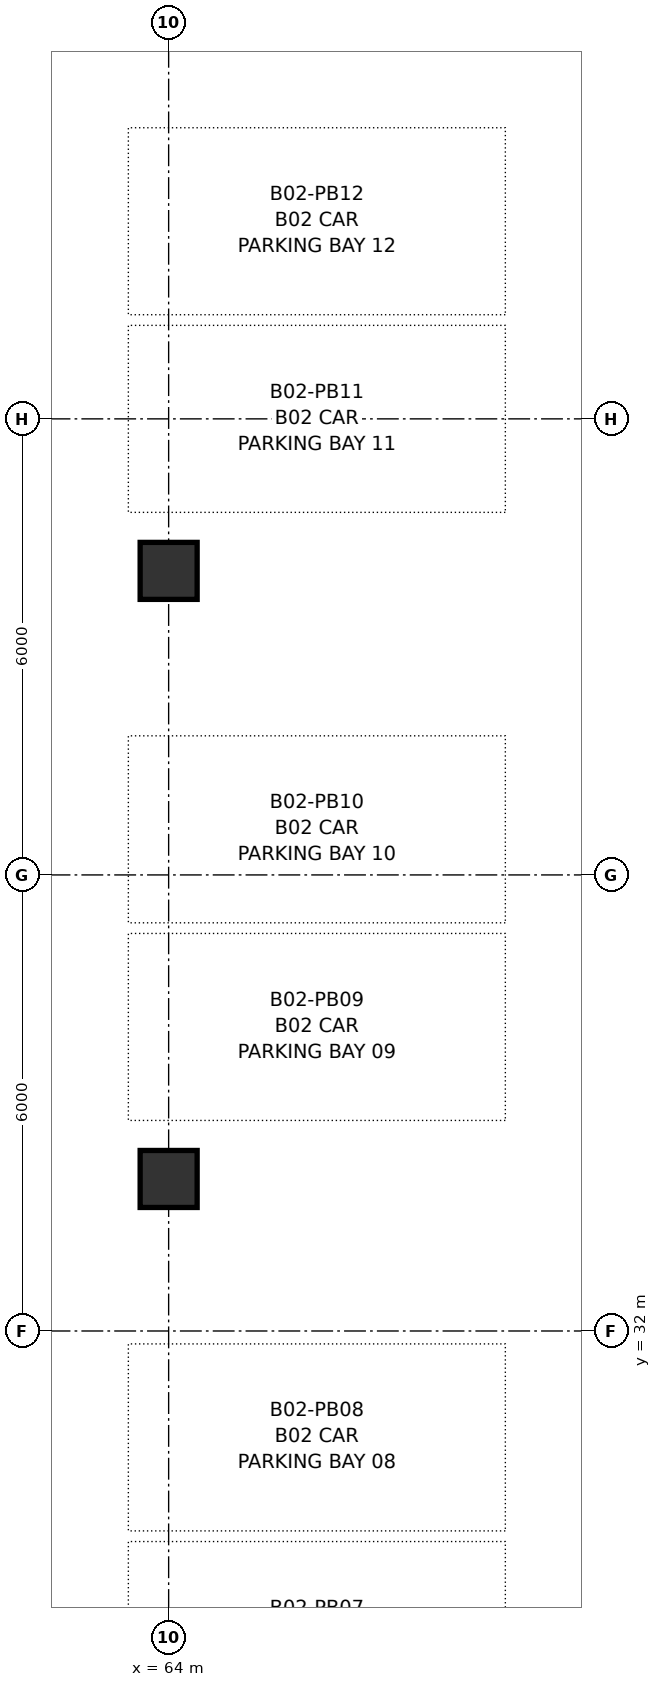
"""IFC4 building model, lengths in metres.
Left out: names, types, materials, properties, quantities, classifications, styles, units other than length and angle.
Written with IfcOpenShell. Run it as: python <this file> out.ifc"""

import sys

from ifc_helpers import new_model, si_unit, direction, frame, origin, origin_2d, place, context, subcontext, project, spatial, rectangle, extrude, source, transform, mapped, element, save


model = new_model("IFC4")
c1 = context("Model", 3, precision=1e-05, world=origin(), true_north=direction((0.0, 1.0)))
c2 = subcontext(c1, "Body", "Model", "MODEL_VIEW")
j1 = project(units=[si_unit("LENGTHUNIT", "METRE"), si_unit("PLANEANGLEUNIT", "RADIAN")], contexts=[c1])
p1 = place(None, origin())
s1 = spatial("IfcSite", under=j1, at=p1, CompositionType="ELEMENT")
p2 = place(p1, origin())
s2 = spatial("IfcBuilding", under=s1, at=p2, CompositionType="ELEMENT")
p3 = place(p2, frame((0.0, 0.0, -8.7)))
s3 = spatial("IfcBuildingStorey", under=s2, at=p3, CompositionType="ELEMENT", Elevation=-8.7)
m1 = source(origin(), c2, "Body", "SweptSolid", [
    extrude(rectangle(XDim=0.75, YDim=0.75, at=origin_2d()), origin(), (0.0, 0.0, 1.0), 4.2),
])
for number, where, z_axis, x_axis in (
    (1, (64.0, 34.0, 0.0), (0.0, 0.0, 1.0), (1.0, 0.0, 0.0)),
    (2, (64.0, 42.0, 0.0), (0.0, 0.0, 1.0), (1.0, 0.0, 0.0)),
):
    element("IfcColumn", number, at=place(p3, frame(where, z_axis=z_axis, x_axis=x_axis)), inside=s3, PredefinedType="COLUMN", context=c2, shape_type="MappedRepresentation", body=[
        mapped(m1, transform((0.0, 0.0, 0.0), x_axis=(1.0, 0.0, 0.0), y_axis=(0.0, 1.0, 0.0), z_axis=(0.0, 0.0, 1.0), scale=1.0)),
    ])
save(model, sys.argv[1])
